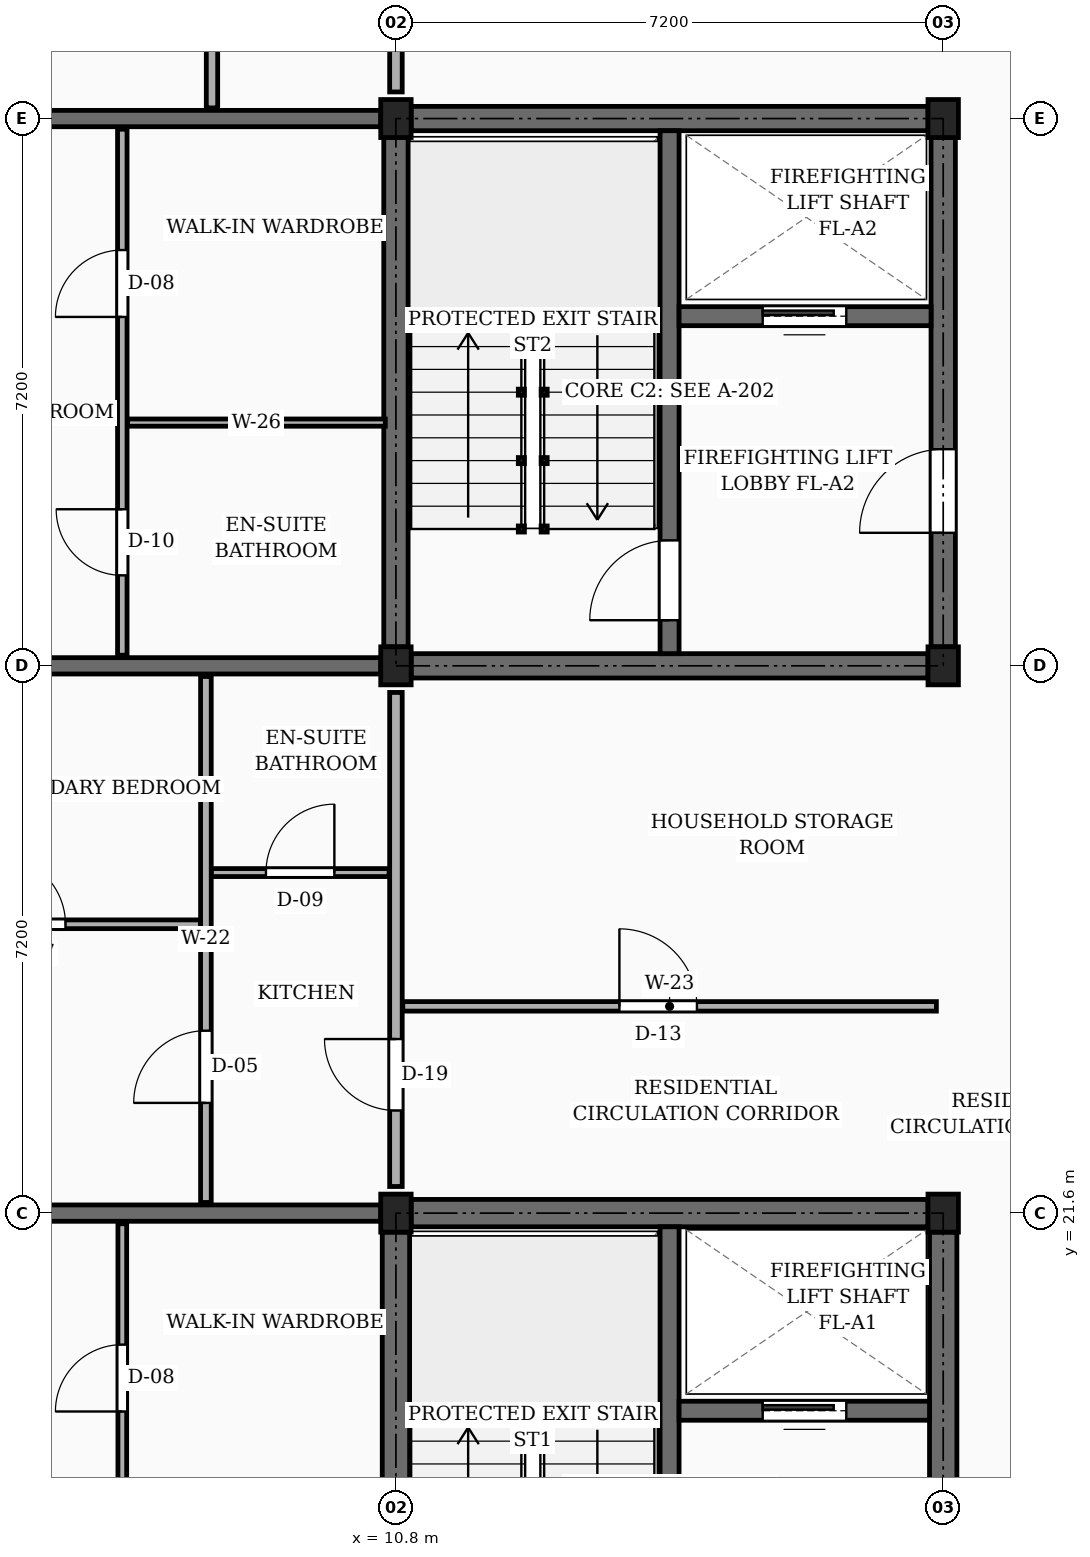
"""IFC4 building model, lengths in metres.
Left out: names, types, materials, properties, quantities, classifications, styles, units other than length and angle.
Written with IfcOpenShell. Run it as: python <this file> out.ifc"""

import sys

from ifc_helpers import new_model, si_unit, direction, frame, frame_2d, origin, origin_2d, place, context, subcontext, project, spatial, rectangle, extrude, element, fill, save


model = new_model("IFC4")
c1 = context("Model", 3, precision=1e-05, world=origin(), true_north=direction((0.0, 1.0)))
c2 = subcontext(c1, "Body", "Model", "MODEL_VIEW")
j1 = project(units=[si_unit("LENGTHUNIT", "METRE"), si_unit("PLANEANGLEUNIT", "RADIAN")], contexts=[c1])
p1 = place(None, origin())
s1 = spatial("IfcSite", under=j1, at=p1, CompositionType="ELEMENT")
p2 = place(p1, origin())
s2 = spatial("IfcBuilding", under=s1, at=p2, CompositionType="ELEMENT")
p3 = place(p2, frame((0.0, 0.0, 36.0)))
s3 = spatial("IfcBuildingStorey", under=s2, at=p3, CompositionType="ELEMENT", Elevation=36.0)
for number, where, z_axis, x_axis in (
    (1, (10.8, 21.6, 0.0), (0.0, 0.0, 1.0), (1.0, 0.0, 0.0)),
    (2, (10.8, 28.8, 0.0), (0.0, 0.0, 1.0), (1.0, 0.0, 0.0)),
    (3, (10.8, 36.0, 0.0), (0.0, 0.0, 1.0), (1.0, 0.0, 0.0)),
    (4, (18.0, 21.6, 0.0), (0.0, 0.0, 1.0), (1.0, 0.0, 0.0)),
    (5, (18.0, 28.8, 0.0), (0.0, 0.0, 1.0), (1.0, 0.0, 0.0)),
    (6, (18.0, 36.0, 0.0), (0.0, 0.0, 1.0), (1.0, 0.0, 0.0)),
):
    element("IfcColumn", number, at=place(p3, frame(where, z_axis=z_axis, x_axis=x_axis)), inside=s3, PredefinedType="COLUMN", context=c2, shape_type="SweptSolid", body=[
        extrude(rectangle(XDim=0.4, YDim=0.5, at=origin_2d()), origin(), (0.0, 0.0, 1.0), 3.15),
    ])
p4 = place(p3, frame((3.825, 21.6, 0.0), z_axis=(0.0, 0.0, 1.0), x_axis=(1.0, 0.0, 0.0)))
e7 = element("IfcWall", 7, at=p4, inside=s3, PredefinedType="SOLIDWALL", context=c2, shape_type="SweptSolid", body=[
    extrude(rectangle(XDim=6.775, YDim=0.215, at=frame_2d((3.388, 0.0))), origin(), (0.0, 0.0, 1.0), 2.17),
])
p5 = place(p3, frame((3.825, 28.8, 0.0), z_axis=(0.0, 0.0, 1.0), x_axis=(1.0, 0.0, 0.0)))
e8 = element("IfcWall", 8, at=p5, inside=s3, PredefinedType="SOLIDWALL", context=c2, shape_type="SweptSolid", body=[
    extrude(rectangle(XDim=6.775, YDim=0.215, at=frame_2d((3.388, 0.0))), origin(), (0.0, 0.0, 1.0), 2.17),
])
p6 = place(p5, frame((1.35, 0.0, 0.0)))
e9 = element("IfcOpeningElement", 9, at=p6, cuts=e8, PredefinedType="OPENING", context=c2, shape_type="SweptSolid", body=[
    extrude(rectangle(XDim=0.98, YDim=2.12, at=frame_2d((0.49, 1.06))), frame((0.0, 0.118, 0.0), z_axis=(0.0, -1.0, 0.0), x_axis=(1.0, 0.0, 0.0)), (0.0, 0.0, 1.0), 0.235),
])
p7 = place(p3, frame((3.825, 36.0, 0.0), z_axis=(0.0, 0.0, 1.0), x_axis=(1.0, 0.0, 0.0)))
e10 = element("IfcWall", 10, at=p7, inside=s3, PredefinedType="SOLIDWALL", context=c2, shape_type="SweptSolid", body=[
    extrude(rectangle(XDim=6.775, YDim=0.215, at=frame_2d((3.388, 0.0))), origin(), (0.0, 0.0, 1.0), 2.17),
])
p8 = place(p3, frame((10.8, 14.65, 0.0), z_axis=(0.0, 0.0, 1.0), x_axis=(0.0, 1.0, 0.0)))
e11 = element("IfcWall", 11, at=p8, inside=s3, PredefinedType="SHEAR", context=c2, shape_type="SweptSolid", body=[
    extrude(rectangle(XDim=6.7, YDim=0.36, at=frame_2d((3.35, 0.0))), origin(), (0.0, 0.0, 1.0), 2.87),
])
p9 = place(p3, frame((11.0, 21.6, 0.0), z_axis=(0.0, 0.0, 1.0), x_axis=(1.0, 0.0, 0.0)))
e12 = element("IfcWall", 12, at=p9, inside=s3, PredefinedType="SHEAR", context=c2, shape_type="SweptSolid", body=[
    extrude(rectangle(XDim=6.8, YDim=0.36, at=frame_2d((3.4, 0.0))), origin(), (0.0, 0.0, 1.0), 2.87),
])
p10 = place(p3, frame((18.0, 14.65, 0.0), z_axis=(0.0, 0.0, 1.0), x_axis=(0.0, 1.0, 0.0)))
e13 = element("IfcWall", 13, at=p10, inside=s3, PredefinedType="SHEAR", context=c2, shape_type="SweptSolid", body=[
    extrude(rectangle(XDim=6.7, YDim=0.36, at=frame_2d((3.35, 0.0))), origin(), (0.0, 0.0, 1.0), 2.87),
])
p11 = place(p10, frame((1.5, 0.0, 0.0)))
e14 = element("IfcOpeningElement", 14, at=p11, cuts=e13, PredefinedType="OPENING", context=c2, shape_type="SweptSolid", body=[
    extrude(rectangle(XDim=1.1, YDim=2.15, at=frame_2d((0.55, 1.075))), frame((0.0, 0.19, 0.0), z_axis=(0.0, -1.0, 0.0), x_axis=(1.0, 0.0, 0.0)), (0.0, 0.0, 1.0), 0.38),
])
p12 = place(p3, frame((14.4, 14.58, 0.0), z_axis=(0.0, 0.0, 1.0), x_axis=(0.0, 1.0, 0.0)))
e15 = element("IfcWall", 15, at=p12, inside=s3, PredefinedType="SHEAR", context=c2, shape_type="SweptSolid", body=[
    extrude(rectangle(XDim=6.84, YDim=0.25, at=frame_2d((3.42, 0.0))), origin(), (0.0, 0.0, 1.0), 2.87),
])
p13 = place(p12, frame((0.42, 0.0, 0.0)))
e16 = element("IfcOpeningElement", 16, at=p13, cuts=e15, PredefinedType="OPENING", context=c2, shape_type="SweptSolid", body=[
    extrude(rectangle(XDim=1.05, YDim=2.15, at=frame_2d((0.525, 1.075))), frame((0.0, 0.135, 0.0), z_axis=(0.0, -1.0, 0.0), x_axis=(1.0, 0.0, 0.0)), (0.0, 0.0, 1.0), 0.27),
])
p14 = place(p3, frame((14.525, 19.0, 0.0), z_axis=(0.0, 0.0, 1.0), x_axis=(1.0, 0.0, 0.0)))
e17 = element("IfcWall", 17, at=p14, inside=s3, PredefinedType="SHEAR", context=c2, shape_type="SweptSolid", body=[
    extrude(rectangle(XDim=3.295, YDim=0.25, at=frame_2d((1.647, 0.0))), origin(), (0.0, 0.0, 1.0), 2.87),
])
p15 = place(p14, frame((1.1, 0.0, 0.0)))
e18 = element("IfcOpeningElement", 18, at=p15, cuts=e17, PredefinedType="OPENING", context=c2, shape_type="SweptSolid", body=[
    extrude(rectangle(XDim=1.1, YDim=2.2, at=frame_2d((0.55, 1.1))), frame((0.0, 0.135, 0.0), z_axis=(0.0, -1.0, 0.0), x_axis=(1.0, 0.0, 0.0)), (0.0, 0.0, 1.0), 0.27),
])
p16 = place(p3, frame((10.8, 29.05, 0.0), z_axis=(0.0, 0.0, 1.0), x_axis=(0.0, 1.0, 0.0)))
e19 = element("IfcWall", 19, at=p16, inside=s3, PredefinedType="SHEAR", context=c2, shape_type="SweptSolid", body=[
    extrude(rectangle(XDim=6.7, YDim=0.32, at=frame_2d((3.35, 0.0))), origin(), (0.0, 0.0, 1.0), 2.87),
])
p17 = place(p3, frame((11.0, 36.0, 0.0), z_axis=(0.0, 0.0, 1.0), x_axis=(1.0, 0.0, 0.0)))
e20 = element("IfcWall", 20, at=p17, inside=s3, PredefinedType="SHEAR", context=c2, shape_type="SweptSolid", body=[
    extrude(rectangle(XDim=6.8, YDim=0.32, at=frame_2d((3.4, 0.0))), origin(), (0.0, 0.0, 1.0), 2.87),
])
p18 = place(p3, frame((18.0, 29.05, 0.0), z_axis=(0.0, 0.0, 1.0), x_axis=(0.0, 1.0, 0.0)))
e21 = element("IfcWall", 21, at=p18, inside=s3, PredefinedType="SHEAR", context=c2, shape_type="SweptSolid", body=[
    extrude(rectangle(XDim=6.7, YDim=0.32, at=frame_2d((3.35, 0.0))), origin(), (0.0, 0.0, 1.0), 2.87),
])
p19 = place(p18, frame((1.5, 0.0, 0.0)))
e22 = element("IfcOpeningElement", 22, at=p19, cuts=e21, PredefinedType="OPENING", context=c2, shape_type="SweptSolid", body=[
    extrude(rectangle(XDim=1.1, YDim=2.15, at=frame_2d((0.55, 1.075))), frame((0.0, 0.17, 0.0), z_axis=(0.0, -1.0, 0.0), x_axis=(1.0, 0.0, 0.0)), (0.0, 0.0, 1.0), 0.34),
])
p20 = place(p3, frame((11.0, 28.8, 0.0), z_axis=(0.0, 0.0, 1.0), x_axis=(1.0, 0.0, 0.0)))
e23 = element("IfcWall", 23, at=p20, inside=s3, PredefinedType="SHEAR", context=c2, shape_type="SweptSolid", body=[
    extrude(rectangle(XDim=6.8, YDim=0.32, at=frame_2d((3.4, 0.0))), origin(), (0.0, 0.0, 1.0), 2.87),
])
p21 = place(p3, frame((14.4, 28.96, 0.0), z_axis=(0.0, 0.0, 1.0), x_axis=(0.0, 1.0, 0.0)))
e24 = element("IfcWall", 24, at=p21, inside=s3, PredefinedType="SHEAR", context=c2, shape_type="SweptSolid", body=[
    extrude(rectangle(XDim=6.88, YDim=0.25, at=frame_2d((3.44, 0.0))), origin(), (0.0, 0.0, 1.0), 2.87),
])
p22 = place(p21, frame((0.44, 0.0, 0.0)))
e25 = element("IfcOpeningElement", 25, at=p22, cuts=e24, PredefinedType="OPENING", context=c2, shape_type="SweptSolid", body=[
    extrude(rectangle(XDim=1.05, YDim=2.15, at=frame_2d((0.525, 1.075))), frame((0.0, 0.135, 0.0), z_axis=(0.0, -1.0, 0.0), x_axis=(1.0, 0.0, 0.0)), (0.0, 0.0, 1.0), 0.27),
])
p23 = place(p3, frame((14.525, 33.4, 0.0), z_axis=(0.0, 0.0, 1.0), x_axis=(1.0, 0.0, 0.0)))
e26 = element("IfcWall", 26, at=p23, inside=s3, PredefinedType="SHEAR", context=c2, shape_type="SweptSolid", body=[
    extrude(rectangle(XDim=3.315, YDim=0.25, at=frame_2d((1.658, 0.0))), origin(), (0.0, 0.0, 1.0), 2.87),
])
p24 = place(p23, frame((1.1, 0.0, 0.0)))
e27 = element("IfcOpeningElement", 27, at=p24, cuts=e26, PredefinedType="OPENING", context=c2, shape_type="SweptSolid", body=[
    extrude(rectangle(XDim=1.1, YDim=2.2, at=frame_2d((0.55, 1.1))), frame((0.0, 0.135, 0.0), z_axis=(0.0, -1.0, 0.0), x_axis=(1.0, 0.0, 0.0)), (0.0, 0.0, 1.0), 0.27),
])
p25 = place(p3, frame((10.8, 21.95, 0.0), z_axis=(0.0, 0.0, 1.0), x_axis=(0.0, 1.0, 0.0)))
e28 = element("IfcWall", 28, at=p25, inside=s3, PredefinedType="PARTITIONING", context=c2, shape_type="SweptSolid", body=[
    extrude(rectangle(XDim=6.5, YDim=0.165, at=frame_2d((3.25, 0.0))), origin(), (0.0, 0.0, 1.0), 2.305),
])
p26 = place(p25, frame((1.0, 0.0, 0.0)))
e29 = element("IfcOpeningElement", 29, at=p26, cuts=e28, PredefinedType="OPENING", context=c2, shape_type="SweptSolid", body=[
    extrude(rectangle(XDim=0.94, YDim=2.12, at=frame_2d((0.47, 1.06))), frame((0.0, 0.093, 0.0), z_axis=(0.0, -1.0, 0.0), x_axis=(1.0, 0.0, 0.0)), (0.0, 0.0, 1.0), 0.185),
])
p27 = place(p3, frame((10.8, 36.35, 0.0), z_axis=(0.0, 0.0, 1.0), x_axis=(0.0, 1.0, 0.0)))
e30 = element("IfcWall", 30, at=p27, inside=s3, PredefinedType="PARTITIONING", context=c2, shape_type="SweptSolid", body=[
    extrude(rectangle(XDim=6.5, YDim=0.165, at=frame_2d((3.25, 0.0))), origin(), (0.0, 0.0, 1.0), 2.305),
])
p28 = place(p27, frame((1.0, 0.0, 0.0)))
e31 = element("IfcOpeningElement", 31, at=p28, cuts=e30, PredefinedType="OPENING", context=c2, shape_type="SweptSolid", body=[
    extrude(rectangle(XDim=1.14, YDim=2.18, at=frame_2d((0.57, 1.09))), frame((0.0, 0.093, 0.0), z_axis=(0.0, -1.0, 0.0), x_axis=(1.0, 0.0, 0.0)), (0.0, 0.0, 1.0), 0.185),
])
p29 = place(p3, frame((7.2, 14.54, 0.0), z_axis=(0.0, 0.0, 1.0), x_axis=(0.0, 1.0, 0.0)))
e32 = element("IfcWall", 32, at=p29, inside=s3, PredefinedType="PARTITIONING", context=c2, shape_type="SweptSolid", body=[
    extrude(rectangle(XDim=6.92, YDim=0.115, at=frame_2d((3.46, 0.0))), origin(), (0.0, 0.0, 1.0), 2.305),
])
p30 = place(p29, frame((1.05, 0.0, 0.0)))
e33 = element("IfcOpeningElement", 33, at=p30, cuts=e32, PredefinedType="OPENING", context=c2, shape_type="SweptSolid", body=[
    extrude(rectangle(XDim=0.87, YDim=2.05, at=frame_2d((0.435, 1.025))), frame((0.0, 0.067, 0.0), z_axis=(0.0, -1.0, 0.0), x_axis=(1.0, 0.0, 0.0)), (0.0, 0.0, 1.0), 0.135),
])
p31 = place(p29, frame((4.45, 0.0, 0.0)))
e34 = element("IfcOpeningElement", 34, at=p31, cuts=e32, PredefinedType="OPENING", context=c2, shape_type="SweptSolid", body=[
    extrude(rectangle(XDim=0.88, YDim=2.08, at=frame_2d((0.44, 1.04))), frame((0.0, 0.067, 0.0), z_axis=(0.0, -1.0, 0.0), x_axis=(1.0, 0.0, 0.0)), (0.0, 0.0, 1.0), 0.135),
])
p32 = place(p3, frame((10.89, 24.32, 0.0), z_axis=(0.0, 0.0, 1.0), x_axis=(1.0, 0.0, 0.0)))
e35 = element("IfcWall", 35, at=p32, inside=s3, PredefinedType="PARTITIONING", context=c2, shape_type="SweptSolid", body=[
    extrude(rectangle(XDim=7.02, YDim=0.125, at=frame_2d((3.51, 0.0))), origin(), (0.0, 0.0, 1.0), 2.305),
])
p33 = place(p32, frame((2.85, 0.0, 0.0)))
e36 = element("IfcOpeningElement", 36, at=p33, cuts=e35, PredefinedType="OPENING", context=c2, shape_type="SweptSolid", body=[
    extrude(rectangle(XDim=1.02, YDim=2.15, at=frame_2d((0.51, 1.075))), frame((0.0, 0.073, 0.0), z_axis=(0.0, -1.0, 0.0), x_axis=(1.0, 0.0, 0.0)), (0.0, 0.0, 1.0), 0.145),
])
p34 = place(p3, frame((3.775, 25.4, 0.0), z_axis=(0.0, 0.0, 1.0), x_axis=(1.0, 0.0, 0.0)))
e37 = element("IfcWall", 37, at=p34, inside=s3, PredefinedType="PARTITIONING", context=c2, shape_type="SweptSolid", body=[
    extrude(rectangle(XDim=4.455, YDim=0.115, at=frame_2d((2.228, 0.0))), origin(), (0.0, 0.0, 1.0), 2.305),
])
p35 = place(p34, frame((1.778, 0.0, 0.0)))
e38 = element("IfcOpeningElement", 38, at=p35, cuts=e37, PredefinedType="OPENING", context=c2, shape_type="SweptSolid", body=[
    extrude(rectangle(XDim=0.9, YDim=2.1, at=frame_2d((0.45, 1.05))), frame((0.0, 0.067, 0.0), z_axis=(0.0, -1.0, 0.0), x_axis=(1.0, 0.0, 0.0)), (0.0, 0.0, 1.0), 0.135),
])
p36 = place(p3, frame((8.37, 26.08, 0.0), z_axis=(0.0, 0.0, 1.0), x_axis=(1.0, 0.0, 0.0)))
e39 = element("IfcWall", 39, at=p36, inside=s3, PredefinedType="PARTITIONING", context=c2, shape_type="SweptSolid", body=[
    extrude(rectangle(XDim=2.34, YDim=0.105, at=frame_2d((1.17, 0.0))), origin(), (0.0, 0.0, 1.0), 2.305),
])
p37 = place(p36, frame((0.72, 0.0, 0.0)))
e40 = element("IfcOpeningElement", 40, at=p37, cuts=e39, PredefinedType="OPENING", context=c2, shape_type="SweptSolid", body=[
    extrude(rectangle(XDim=0.9, YDim=2.05, at=frame_2d((0.45, 1.025))), frame((0.0, 0.062, 0.0), z_axis=(0.0, -1.0, 0.0), x_axis=(1.0, 0.0, 0.0)), (0.0, 0.0, 1.0), 0.125),
])
p38 = place(p3, frame((8.3, 21.74, 0.0), z_axis=(0.0, 0.0, 1.0), x_axis=(0.0, 1.0, 0.0)))
e41 = element("IfcWall", 41, at=p38, inside=s3, PredefinedType="PARTITIONING", context=c2, shape_type="SweptSolid", body=[
    extrude(rectangle(XDim=6.92, YDim=0.14, at=frame_2d((3.46, 0.0))), origin(), (0.0, 0.0, 1.0), 2.305),
])
p39 = place(p38, frame((1.31, 0.0, 0.0)))
e42 = element("IfcOpeningElement", 42, at=p39, cuts=e41, PredefinedType="OPENING", context=c2, shape_type="SweptSolid", body=[
    extrude(rectangle(XDim=0.95, YDim=2.1, at=frame_2d((0.475, 1.05))), frame((0.0, 0.08, 0.0), z_axis=(0.0, -1.0, 0.0), x_axis=(1.0, 0.0, 0.0)), (0.0, 0.0, 1.0), 0.16),
])
p40 = place(p3, frame((7.2, 28.94, 0.0), z_axis=(0.0, 0.0, 1.0), x_axis=(0.0, 1.0, 0.0)))
e43 = element("IfcWall", 43, at=p40, inside=s3, PredefinedType="PARTITIONING", context=c2, shape_type="SweptSolid", body=[
    extrude(rectangle(XDim=6.92, YDim=0.125, at=frame_2d((3.46, 0.0))), origin(), (0.0, 0.0, 1.0), 2.305),
])
p41 = place(p40, frame((1.05, 0.0, 0.0)))
e44 = element("IfcOpeningElement", 44, at=p41, cuts=e43, PredefinedType="OPENING", context=c2, shape_type="SweptSolid", body=[
    extrude(rectangle(XDim=0.87, YDim=2.05, at=frame_2d((0.435, 1.025))), frame((0.0, 0.073, 0.0), z_axis=(0.0, -1.0, 0.0), x_axis=(1.0, 0.0, 0.0)), (0.0, 0.0, 1.0), 0.145),
])
p42 = place(p40, frame((4.45, 0.0, 0.0)))
e45 = element("IfcOpeningElement", 45, at=p42, cuts=e43, PredefinedType="OPENING", context=c2, shape_type="SweptSolid", body=[
    extrude(rectangle(XDim=0.88, YDim=2.08, at=frame_2d((0.44, 1.04))), frame((0.0, 0.073, 0.0), z_axis=(0.0, -1.0, 0.0), x_axis=(1.0, 0.0, 0.0)), (0.0, 0.0, 1.0), 0.145),
])
p43 = place(p3, frame((7.27, 32.0, 0.0), z_axis=(0.0, 0.0, 1.0), x_axis=(1.0, 0.0, 0.0)))
e46 = element("IfcWall", 46, at=p43, inside=s3, PredefinedType="PARTITIONING", context=c2, shape_type="SweptSolid", body=[
    extrude(rectangle(XDim=3.39, YDim=0.095, at=frame_2d((1.695, 0.0))), origin(), (0.0, 0.0, 1.0), 2.305),
])
p44 = place(p3, frame((8.38, 36.14, 0.0), z_axis=(0.0, 0.0, 1.0), x_axis=(0.0, 1.0, 0.0)))
e47 = element("IfcWall", 47, at=p44, inside=s3, PredefinedType="PARTITIONING", context=c2, shape_type="SweptSolid", body=[
    extrude(rectangle(XDim=6.885, YDim=0.15, at=frame_2d((3.442, 0.0))), origin(), (0.0, 0.0, 1.0), 2.305),
])
p45 = place(p44, frame((1.31, 0.0, 0.0)))
e48 = element("IfcOpeningElement", 48, at=p45, cuts=e47, PredefinedType="OPENING", context=c2, shape_type="SweptSolid", body=[
    extrude(rectangle(XDim=0.92, YDim=2.1, at=frame_2d((0.46, 1.05))), frame((0.0, 0.085, 0.0), z_axis=(0.0, -1.0, 0.0), x_axis=(1.0, 0.0, 0.0)), (0.0, 0.0, 1.0), 0.17),
])
p46 = place(p15, origin())
e49 = element("IfcDoor", 49, at=p46, inside=s3, OperationType="SLIDING_TO_LEFT", PredefinedType="DOOR", context=c2, shape_type="SweptSolid", body=[
    extrude(rectangle(XDim=1.1, YDim=2.2, at=frame_2d((0.55, 1.1))), frame((0.0, 0.025, 0.0), z_axis=(0.0, -1.0, 0.0), x_axis=(1.0, 0.0, 0.0)), (0.0, 0.0, 1.0), 0.05),
])
fill(e18, e49)
p47 = place(p19, frame((1.1, 0.0, 0.0), z_axis=(0.0, 0.0, 1.0), x_axis=(-1.0, 0.0, 0.0)))
e50 = element("IfcDoor", 50, at=p47, inside=s3, OperationType="SINGLE_SWING_LEFT", PredefinedType="DOOR", context=c2, shape_type="SweptSolid", body=[
    extrude(rectangle(XDim=1.1, YDim=2.15, at=frame_2d((0.55, 1.075))), frame((0.0, 0.025, 0.0), z_axis=(0.0, -1.0, 0.0), x_axis=(1.0, 0.0, 0.0)), (0.0, 0.0, 1.0), 0.05),
])
fill(e22, e50)
p48 = place(p22, origin())
e51 = element("IfcDoor", 51, at=p48, inside=s3, OperationType="SINGLE_SWING_LEFT", PredefinedType="DOOR", context=c2, shape_type="SweptSolid", body=[
    extrude(rectangle(XDim=1.05, YDim=2.15, at=frame_2d((0.525, 1.075))), frame((0.0, 0.025, 0.0), z_axis=(0.0, -1.0, 0.0), x_axis=(1.0, 0.0, 0.0)), (0.0, 0.0, 1.0), 0.05),
])
fill(e25, e51)
p49 = place(p24, origin())
e52 = element("IfcDoor", 52, at=p49, inside=s3, OperationType="SLIDING_TO_LEFT", PredefinedType="DOOR", context=c2, shape_type="SweptSolid", body=[
    extrude(rectangle(XDim=1.1, YDim=2.2, at=frame_2d((0.55, 1.1))), frame((0.0, 0.025, 0.0), z_axis=(0.0, -1.0, 0.0), x_axis=(1.0, 0.0, 0.0)), (0.0, 0.0, 1.0), 0.05),
])
fill(e27, e52)
p50 = place(p26, origin())
e53 = element("IfcDoor", 53, at=p50, inside=s3, OperationType="SINGLE_SWING_RIGHT", PredefinedType="DOOR", context=c2, shape_type="SweptSolid", body=[
    extrude(rectangle(XDim=0.94, YDim=2.12, at=frame_2d((0.47, 1.06))), frame((0.0, 0.025, 0.0), z_axis=(0.0, -1.0, 0.0), x_axis=(1.0, 0.0, 0.0)), (0.0, 0.0, 1.0), 0.05),
])
fill(e29, e53)
p51 = place(p31, origin())
e54 = element("IfcDoor", 54, at=p51, inside=s3, OperationType="SINGLE_SWING_LEFT", PredefinedType="DOOR", context=c2, shape_type="SweptSolid", body=[
    extrude(rectangle(XDim=0.88, YDim=2.08, at=frame_2d((0.44, 1.04))), frame((0.0, 0.025, 0.0), z_axis=(0.0, -1.0, 0.0), x_axis=(1.0, 0.0, 0.0)), (0.0, 0.0, 1.0), 0.05),
])
fill(e34, e54)
p52 = place(p33, origin())
e55 = element("IfcDoor", 55, at=p52, inside=s3, OperationType="SINGLE_SWING_LEFT", PredefinedType="DOOR", context=c2, shape_type="SweptSolid", body=[
    extrude(rectangle(XDim=1.02, YDim=2.15, at=frame_2d((0.51, 1.075))), frame((0.0, 0.025, 0.0), z_axis=(0.0, -1.0, 0.0), x_axis=(1.0, 0.0, 0.0)), (0.0, 0.0, 1.0), 0.05),
])
fill(e36, e55)
p53 = place(p35, origin())
e56 = element("IfcDoor", 56, at=p53, inside=s3, OperationType="SINGLE_SWING_LEFT", PredefinedType="DOOR", context=c2, shape_type="SweptSolid", body=[
    extrude(rectangle(XDim=0.9, YDim=2.1, at=frame_2d((0.45, 1.05))), frame((0.0, 0.025, 0.0), z_axis=(0.0, -1.0, 0.0), x_axis=(1.0, 0.0, 0.0)), (0.0, 0.0, 1.0), 0.05),
])
fill(e38, e56)
p54 = place(p37, origin())
e57 = element("IfcDoor", 57, at=p54, inside=s3, OperationType="SINGLE_SWING_RIGHT", PredefinedType="DOOR", context=c2, shape_type="SweptSolid", body=[
    extrude(rectangle(XDim=0.9, YDim=2.05, at=frame_2d((0.45, 1.025))), frame((0.0, 0.025, 0.0), z_axis=(0.0, -1.0, 0.0), x_axis=(1.0, 0.0, 0.0)), (0.0, 0.0, 1.0), 0.05),
])
fill(e40, e57)
p55 = place(p39, origin())
e58 = element("IfcDoor", 58, at=p55, inside=s3, OperationType="SINGLE_SWING_LEFT", PredefinedType="DOOR", context=c2, shape_type="SweptSolid", body=[
    extrude(rectangle(XDim=0.95, YDim=2.1, at=frame_2d((0.475, 1.05))), frame((0.0, 0.025, 0.0), z_axis=(0.0, -1.0, 0.0), x_axis=(1.0, 0.0, 0.0)), (0.0, 0.0, 1.0), 0.05),
])
fill(e42, e58)
p56 = place(p41, origin())
e59 = element("IfcDoor", 59, at=p56, inside=s3, OperationType="SINGLE_SWING_RIGHT", PredefinedType="DOOR", context=c2, shape_type="SweptSolid", body=[
    extrude(rectangle(XDim=0.87, YDim=2.05, at=frame_2d((0.435, 1.025))), frame((0.0, 0.025, 0.0), z_axis=(0.0, -1.0, 0.0), x_axis=(1.0, 0.0, 0.0)), (0.0, 0.0, 1.0), 0.05),
])
fill(e44, e59)
p57 = place(p42, origin())
e60 = element("IfcDoor", 60, at=p57, inside=s3, OperationType="SINGLE_SWING_LEFT", PredefinedType="DOOR", context=c2, shape_type="SweptSolid", body=[
    extrude(rectangle(XDim=0.88, YDim=2.08, at=frame_2d((0.44, 1.04))), frame((0.0, 0.025, 0.0), z_axis=(0.0, -1.0, 0.0), x_axis=(1.0, 0.0, 0.0)), (0.0, 0.0, 1.0), 0.05),
])
fill(e45, e60)
save(model, sys.argv[1])
